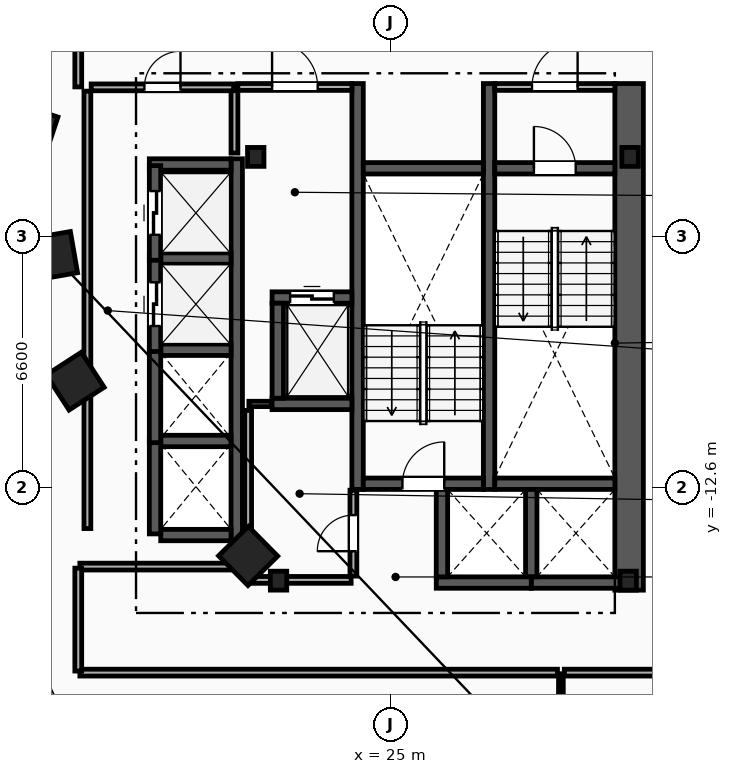
"""IFC4 building model, lengths in metres.
Left out: names, types, materials, properties, quantities, classifications, styles, units other than length and angle.
Written with IfcOpenShell. Run it as: python <this file> out.ifc"""

import sys

from ifc_helpers import new_model, si_unit, direction, frame, frame_2d, origin, origin_2d, place, context, subcontext, project, spatial, rectangle, i_section, extrude, element, fill, save


model = new_model("IFC4")
c1 = context("Model", 3, precision=1e-05, world=origin(), true_north=direction((0.0, 1.0)))
c2 = subcontext(c1, "Body", "Model", "MODEL_VIEW")
j1 = project(units=[si_unit("LENGTHUNIT", "METRE"), si_unit("PLANEANGLEUNIT", "RADIAN")], contexts=[c1])
p1 = place(None, origin())
s1 = spatial("IfcSite", under=j1, at=p1, CompositionType="ELEMENT")
p2 = place(p1, origin())
s2 = spatial("IfcBuilding", under=s1, at=p2, CompositionType="ELEMENT")
p3 = place(p2, frame((0.0, 0.0, 96.2)))
s3 = spatial("IfcBuildingStorey", under=s2, at=p3, CompositionType="ELEMENT", Elevation=96.2)
for number, where, z_axis, x_axis in (
    (1, (31.3, -3.9, 0.0), (0.0, 0.0, 1.0), (1.0, 0.0, 0.0)),
    (2, (21.45, -3.9, 0.0), (0.0, 0.0, 1.0), (1.0, 0.0, 0.0)),
    (3, (22.05, -15.05, 0.0), (0.0, 0.0, 1.0), (1.0, 0.0, 0.0)),
    (4, (31.25, -15.05, 0.0), (0.0, 0.0, 1.0), (1.0, 0.0, 0.0)),
):
    element("IfcColumn", number, at=place(p3, frame(where, z_axis=z_axis, x_axis=x_axis)), inside=s3, PredefinedType="COLUMN", context=c2, shape_type="SweptSolid", body=[
        extrude(i_section(OverallWidth=0.432, OverallDepth=0.498, WebThickness=0.056, FlangeThickness=0.089, FilletRadius=0.018, at=origin_2d()), origin(), (0.0, 0.0, 1.0), 3.6),
    ])
for number, where, z_axis, x_axis in (
    (5, (15.55, -3.2, 0.0), (0.0, 0.0, 1.0), (-0.315, -0.949, 0.0)),
    (6, (16.125, -6.5, 0.0), (0.0, 0.0, 1.0), (0.172, -0.985, 0.0)),
    (7, (16.7, -9.8, 0.0), (0.0, 0.0, 1.0), (0.544, -0.839, 0.0)),
    (8, (21.25, -14.4, 0.0), (0.0, 0.0, 1.0), (0.703, -0.711, 0.0)),
):
    element("IfcColumn", number, at=place(p3, frame(where, z_axis=z_axis, x_axis=x_axis)), inside=s3, PredefinedType="COLUMN", context=c2, shape_type="SweptSolid", body=[
        extrude(rectangle(XDim=1.1, YDim=1.1, at=origin_2d()), origin(), (0.0, 0.0, 1.0), 3.6),
    ])
p4 = place(p3, frame((31.275, -15.3, 0.0), z_axis=(0.0, 0.0, 1.0), x_axis=(0.0, 1.0, 0.0)))
e9 = element("IfcWall", 9, at=p4, inside=s3, PredefinedType="SHEAR", context=c2, shape_type="SweptSolid", body=[
    extrude(rectangle(XDim=13.33, YDim=0.75, at=frame_2d((6.665, 0.0))), origin(), (0.0, 0.0, 1.0), 3.3),
])
for number, where, z_axis, x_axis in (
    (10, (27.59, -12.65, 0.0), (0.0, 0.0, 1.0), (0.0, 1.0, 0.0)),
    (11, (24.13, -12.65, 0.0), (0.0, 0.0, 1.0), (0.0, 1.0, 0.0)),
):
    element("IfcWall", number, at=place(p3, frame(where, z_axis=z_axis, x_axis=x_axis)), inside=s3, PredefinedType="SHEAR", context=c2, shape_type="SweptSolid", body=[
        extrude(rectangle(XDim=10.68, YDim=0.3, at=frame_2d((5.34, 0.0))), origin(), (0.0, 0.0, 1.0), 3.3),
    ])
p5 = place(p3, frame((27.74, -4.2, 0.0), z_axis=(0.0, 0.0, 1.0), x_axis=(1.0, 0.0, 0.0)))
e12 = element("IfcWall", 12, at=p5, inside=s3, PredefinedType="SHEAR", context=c2, shape_type="SweptSolid", body=[
    extrude(rectangle(XDim=3.16, YDim=0.3, at=frame_2d((1.58, 0.0))), origin(), (0.0, 0.0, 1.0), 3.3),
])
p6 = place(p5, frame((1.03, 0.0, 0.0)))
e13 = element("IfcOpeningElement", 13, at=p6, cuts=e12, PredefinedType="OPENING", context=c2, shape_type="SweptSolid", body=[
    extrude(rectangle(XDim=1.1, YDim=2.15, at=frame_2d((0.55, 1.075))), frame((0.0, 0.16, 0.0), z_axis=(0.0, -1.0, 0.0), x_axis=(1.0, 0.0, 0.0)), (0.0, 0.0, 1.0), 0.32),
])
p7 = place(p3, frame((27.74, -12.5, 0.0), z_axis=(0.0, 0.0, 1.0), x_axis=(1.0, 0.0, 0.0)))
e14 = element("IfcWall", 14, at=p7, inside=s3, PredefinedType="SHEAR", context=c2, shape_type="SweptSolid", body=[
    extrude(rectangle(XDim=3.16, YDim=0.3, at=frame_2d((1.58, 0.0))), origin(), (0.0, 0.0, 1.0), 3.3),
])
p8 = place(p3, frame((24.28, -12.5, 0.0), z_axis=(0.0, 0.0, 1.0), x_axis=(1.0, 0.0, 0.0)))
e15 = element("IfcWall", 15, at=p8, inside=s3, PredefinedType="SHEAR", context=c2, shape_type="SweptSolid", body=[
    extrude(rectangle(XDim=3.16, YDim=0.3, at=frame_2d((1.58, 0.0))), origin(), (0.0, 0.0, 1.0), 3.3),
])
p9 = place(p8, frame((1.03, 0.0, 0.0)))
e16 = element("IfcOpeningElement", 16, at=p9, cuts=e15, PredefinedType="OPENING", context=c2, shape_type="SweptSolid", body=[
    extrude(rectangle(XDim=1.1, YDim=2.15, at=frame_2d((0.55, 1.075))), frame((0.0, 0.16, 0.0), z_axis=(0.0, -1.0, 0.0), x_axis=(1.0, 0.0, 0.0)), (0.0, 0.0, 1.0), 0.32),
])
p10 = place(p3, frame((24.28, -4.2, 0.0), z_axis=(0.0, 0.0, 1.0), x_axis=(1.0, 0.0, 0.0)))
e17 = element("IfcWall", 17, at=p10, inside=s3, PredefinedType="SHEAR", context=c2, shape_type="SweptSolid", body=[
    extrude(rectangle(XDim=3.16, YDim=0.3, at=frame_2d((1.58, 0.0))), origin(), (0.0, 0.0, 1.0), 3.3),
])
p11 = place(p3, frame((20.89, -3.8, 0.0), z_axis=(0.0, 0.0, 1.0), x_axis=(0.0, 1.0, 0.0)))
e18 = element("IfcWall", 18, at=p11, inside=s3, PredefinedType="PARTITIONING", context=c2, shape_type="SweptSolid", body=[
    extrude(rectangle(XDim=1.65, YDim=0.18, at=frame_2d((0.825, 0.0))), origin(), (0.0, 0.0, 1.0), 3.3),
])
p12 = place(p3, frame((20.98, -2.06, 0.0), z_axis=(0.0, 0.0, 1.0), x_axis=(1.0, 0.0, 0.0)))
e19 = element("IfcWall", 19, at=p12, inside=s3, PredefinedType="PARTITIONING", context=c2, shape_type="SweptSolid", body=[
    extrude(rectangle(XDim=3.0, YDim=0.18, at=frame_2d((1.5, 0.0))), origin(), (0.0, 0.0, 1.0), 3.3),
])
p13 = place(p12, frame((0.9, 0.0, 0.0)))
e20 = element("IfcOpeningElement", 20, at=p13, cuts=e19, PredefinedType="OPENING", context=c2, shape_type="SweptSolid", body=[
    extrude(rectangle(XDim=1.2, YDim=2.15, at=frame_2d((0.6, 1.075))), frame((0.0, 0.1, 0.0), z_axis=(0.0, -1.0, 0.0), x_axis=(1.0, 0.0, 0.0)), (0.0, 0.0, 1.0), 0.2),
])
p14 = place(p3, frame((27.74, -2.06, 0.0), z_axis=(0.0, 0.0, 1.0), x_axis=(1.0, 0.0, 0.0)))
e21 = element("IfcWall", 21, at=p14, inside=s3, PredefinedType="PARTITIONING", context=c2, shape_type="SweptSolid", body=[
    extrude(rectangle(XDim=3.16, YDim=0.18, at=frame_2d((1.58, 0.0))), origin(), (0.0, 0.0, 1.0), 3.3),
])
p15 = place(p14, frame((0.98, 0.0, 0.0)))
e22 = element("IfcOpeningElement", 22, at=p15, cuts=e21, PredefinedType="OPENING", context=c2, shape_type="SweptSolid", body=[
    extrude(rectangle(XDim=1.2, YDim=2.15, at=frame_2d((0.6, 1.075))), frame((0.0, 0.1, 0.0), z_axis=(0.0, -1.0, 0.0), x_axis=(1.0, 0.0, 0.0)), (0.0, 0.0, 1.0), 0.2),
])
p16 = place(p3, frame((21.88, -7.6, 0.0), z_axis=(0.0, 0.0, 1.0), x_axis=(1.0, 0.0, 0.0)))
e23 = element("IfcWall", 23, at=p16, inside=s3, PredefinedType="SHEAR", context=c2, shape_type="SweptSolid", body=[
    extrude(rectangle(XDim=2.1, YDim=0.3, at=frame_2d((1.05, 0.0))), origin(), (0.0, 0.0, 1.0), 3.3),
])
p17 = place(p16, frame((0.475, 0.0, 0.0)))
e24 = element("IfcOpeningElement", 24, at=p17, cuts=e23, PredefinedType="OPENING", context=c2, shape_type="SweptSolid", body=[
    extrude(rectangle(XDim=1.15, YDim=2.2, at=frame_2d((0.575, 1.1))), frame((0.0, 0.16, 0.0), z_axis=(0.0, -1.0, 0.0), x_axis=(1.0, 0.0, 0.0)), (0.0, 0.0, 1.0), 0.32),
])
p18 = place(p3, frame((21.88, -10.4, 0.0), z_axis=(0.0, 0.0, 1.0), x_axis=(1.0, 0.0, 0.0)))
e25 = element("IfcWall", 25, at=p18, inside=s3, PredefinedType="SHEAR", context=c2, shape_type="SweptSolid", body=[
    extrude(rectangle(XDim=2.1, YDim=0.3, at=frame_2d((1.05, 0.0))), origin(), (0.0, 0.0, 1.0), 3.3),
])
for number, where, z_axis, x_axis in (
    (26, (22.03, -10.25, 0.0), (0.0, 0.0, 1.0), (0.0, 1.0, 0.0)),
    (27, (28.7, -15.1, 0.0), (0.0, 0.0, 1.0), (1.0, 0.0, 0.0)),
):
    element("IfcWall", number, at=place(p3, frame(where, z_axis=z_axis, x_axis=x_axis)), inside=s3, PredefinedType="SHEAR", context=c2, shape_type="SweptSolid", body=[
        extrude(rectangle(XDim=2.5, YDim=0.3, at=frame_2d((1.25, 0.0))), origin(), (0.0, 0.0, 1.0), 3.3),
    ])
p19 = place(p3, frame((28.7, -14.95, 0.0), z_axis=(0.0, 0.0, 1.0), x_axis=(0.0, 1.0, 0.0)))
e28 = element("IfcWall", 28, at=p19, inside=s3, PredefinedType="SHEAR", context=c2, shape_type="SweptSolid", body=[
    extrude(rectangle(XDim=2.3, YDim=0.3, at=frame_2d((1.15, 0.0))), origin(), (0.0, 0.0, 1.0), 3.3),
])
p20 = place(p3, frame((26.2, -15.1, 0.0), z_axis=(0.0, 0.0, 1.0), x_axis=(1.0, 0.0, 0.0)))
e29 = element("IfcWall", 29, at=p20, inside=s3, PredefinedType="SHEAR", context=c2, shape_type="SweptSolid", body=[
    extrude(rectangle(XDim=2.5, YDim=0.3, at=frame_2d((1.25, 0.0))), origin(), (0.0, 0.0, 1.0), 3.3),
])
p21 = place(p3, frame((26.35, -14.95, 0.0), z_axis=(0.0, 0.0, 1.0), x_axis=(0.0, 1.0, 0.0)))
e30 = element("IfcWall", 30, at=p21, inside=s3, PredefinedType="SHEAR", context=c2, shape_type="SweptSolid", body=[
    extrude(rectangle(XDim=2.3, YDim=0.3, at=frame_2d((1.15, 0.0))), origin(), (0.0, 0.0, 1.0), 3.3),
])
p22 = place(p3, frame((20.95, -14.0, 0.0), z_axis=(0.0, 0.0, 1.0), x_axis=(0.0, 1.0, 0.0)))
e31 = element("IfcWall", 31, at=p22, inside=s3, PredefinedType="SHEAR", context=c2, shape_type="SweptSolid", body=[
    extrude(rectangle(XDim=10.05, YDim=0.3, at=frame_2d((5.025, 0.0))), origin(), (0.0, 0.0, 1.0), 3.3),
])
p23 = place(p3, frame((18.95, -13.85, 0.0), z_axis=(0.0, 0.0, 1.0), x_axis=(1.0, 0.0, 0.0)))
e32 = element("IfcWall", 32, at=p23, inside=s3, PredefinedType="SHEAR", context=c2, shape_type="SweptSolid", body=[
    extrude(rectangle(XDim=1.85, YDim=0.3, at=frame_2d((0.925, 0.0))), origin(), (0.0, 0.0, 1.0), 3.3),
])
p24 = place(p3, frame((18.65, -4.1, 0.0), z_axis=(0.0, 0.0, 1.0), x_axis=(1.0, 0.0, 0.0)))
e33 = element("IfcWall", 33, at=p24, inside=s3, PredefinedType="SHEAR", context=c2, shape_type="SweptSolid", body=[
    extrude(rectangle(XDim=2.15, YDim=0.3, at=frame_2d((1.075, 0.0))), origin(), (0.0, 0.0, 1.0), 3.3),
])
for number, where, z_axis, x_axis in (
    (34, (18.95, -11.375, 0.0), (0.0, 0.0, 1.0), (1.0, 0.0, 0.0)),
    (35, (18.95, -8.975, 0.0), (0.0, 0.0, 1.0), (1.0, 0.0, 0.0)),
    (36, (18.95, -6.575, 0.0), (0.0, 0.0, 1.0), (1.0, 0.0, 0.0)),
):
    element("IfcWall", number, at=place(p3, frame(where, z_axis=z_axis, x_axis=x_axis)), inside=s3, PredefinedType="SHEAR", context=c2, shape_type="SweptSolid", body=[
        extrude(rectangle(XDim=1.85, YDim=0.3, at=frame_2d((0.925, 0.0))), origin(), (0.0, 0.0, 1.0), 3.3),
    ])
for number, where, z_axis, x_axis in (
    (37, (18.8, -13.82, 0.0), (0.0, 0.0, 1.0), (0.0, 1.0, 0.0)),
    (38, (18.8, -11.42, 0.0), (0.0, 0.0, 1.0), (0.0, 1.0, 0.0)),
):
    element("IfcWall", number, at=place(p3, frame(where, z_axis=z_axis, x_axis=x_axis)), inside=s3, PredefinedType="SHEAR", context=c2, shape_type="SweptSolid", body=[
        extrude(rectangle(XDim=2.49, YDim=0.3, at=frame_2d((1.245, 0.0))), origin(), (0.0, 0.0, 1.0), 3.3),
    ])
p25 = place(p3, frame((18.8, -9.02, 0.0), z_axis=(0.0, 0.0, 1.0), x_axis=(0.0, 1.0, 0.0)))
e39 = element("IfcWall", 39, at=p25, inside=s3, PredefinedType="SHEAR", context=c2, shape_type="SweptSolid", body=[
    extrude(rectangle(XDim=2.49, YDim=0.3, at=frame_2d((1.245, 0.0))), origin(), (0.0, 0.0, 1.0), 3.3),
])
p26 = place(p25, frame((0.67, 0.0, 0.0)))
e40 = element("IfcOpeningElement", 40, at=p26, cuts=e39, PredefinedType="OPENING", context=c2, shape_type="SweptSolid", body=[
    extrude(rectangle(XDim=1.15, YDim=2.2, at=frame_2d((0.575, 1.1))), frame((0.0, 0.16, 0.0), z_axis=(0.0, -1.0, 0.0), x_axis=(1.0, 0.0, 0.0)), (0.0, 0.0, 1.0), 0.32),
])
p27 = place(p3, frame((18.8, -6.62, 0.0), z_axis=(0.0, 0.0, 1.0), x_axis=(0.0, 1.0, 0.0)))
e41 = element("IfcWall", 41, at=p27, inside=s3, PredefinedType="SHEAR", context=c2, shape_type="SweptSolid", body=[
    extrude(rectangle(XDim=2.49, YDim=0.3, at=frame_2d((1.245, 0.0))), origin(), (0.0, 0.0, 1.0), 3.3),
])
p28 = place(p27, frame((0.67, 0.0, 0.0)))
e42 = element("IfcOpeningElement", 42, at=p28, cuts=e41, PredefinedType="OPENING", context=c2, shape_type="SweptSolid", body=[
    extrude(rectangle(XDim=1.15, YDim=2.2, at=frame_2d((0.575, 1.1))), frame((0.0, 0.16, 0.0), z_axis=(0.0, -1.0, 0.0), x_axis=(1.0, 0.0, 0.0)), (0.0, 0.0, 1.0), 0.32),
])
p29 = place(p3, frame((17.02, -13.68, 0.0), z_axis=(0.0, 0.0, 1.0), x_axis=(0.0, 1.0, 0.0)))
e43 = element("IfcWall", 43, at=p29, inside=s3, PredefinedType="PARTITIONING", context=c2, shape_type="SweptSolid", body=[
    extrude(rectangle(XDim=11.51, YDim=0.18, at=frame_2d((5.755, 0.0))), origin(), (0.0, 0.0, 1.0), 3.3),
])
p30 = place(p3, frame((17.12, -2.07, 0.0), z_axis=(0.0, 0.0, 1.0), x_axis=(1.0, 0.0, 0.0)))
e44 = element("IfcWall", 44, at=p30, inside=s3, PredefinedType="PARTITIONING", context=c2, shape_type="SweptSolid", body=[
    extrude(rectangle(XDim=3.75, YDim=0.18, at=frame_2d((1.875, 0.0))), origin(), (0.0, 0.0, 1.0), 3.3),
])
p31 = place(p30, frame((1.4, 0.0, 0.0)))
e45 = element("IfcOpeningElement", 45, at=p31, cuts=e44, PredefinedType="OPENING", context=c2, shape_type="SweptSolid", body=[
    extrude(rectangle(XDim=0.95, YDim=2.1, at=frame_2d((0.475, 1.05))), frame((0.0, 0.1, 0.0), z_axis=(0.0, -1.0, 0.0), x_axis=(1.0, 0.0, 0.0)), (0.0, 0.0, 1.0), 0.2),
])
p32 = place(p3, frame((21.27, -10.4, 0.0), z_axis=(0.0, 0.0, 1.0), x_axis=(1.0, 0.0, 0.0)))
e46 = element("IfcWall", 46, at=p32, inside=s3, PredefinedType="PARTITIONING", context=c2, shape_type="SweptSolid", body=[
    extrude(rectangle(XDim=0.59, YDim=0.14, at=frame_2d((0.295, 0.0))), origin(), (0.0, 0.0, 1.0), 3.3),
])
p33 = place(p3, frame((21.25, -14.93, 0.0), z_axis=(0.0, 0.0, 1.0), x_axis=(0.0, 1.0, 0.0)))
e47 = element("IfcWall", 47, at=p33, inside=s3, PredefinedType="PARTITIONING", context=c2, shape_type="SweptSolid", body=[
    extrude(rectangle(XDim=4.36, YDim=0.18, at=frame_2d((2.18, 0.0))), origin(), (0.0, 0.0, 1.0), 3.3),
])
p34 = place(p3, frame((21.35, -15.03, 0.0), z_axis=(0.0, 0.0, 1.0), x_axis=(1.0, 0.0, 0.0)))
e48 = element("IfcWall", 48, at=p34, inside=s3, PredefinedType="PARTITIONING", context=c2, shape_type="SweptSolid", body=[
    extrude(rectangle(XDim=2.61, YDim=0.18, at=frame_2d((1.305, 0.0))), origin(), (0.0, 0.0, 1.0), 2.373),
])
p35 = place(p3, frame((24.02, -14.93, 0.0), z_axis=(0.0, 0.0, 1.0), x_axis=(0.0, 1.0, 0.0)))
e49 = element("IfcWall", 49, at=p35, inside=s3, PredefinedType="PARTITIONING", context=c2, shape_type="SweptSolid", body=[
    extrude(rectangle(XDim=2.26, YDim=0.18, at=frame_2d((1.13, 0.0))), origin(), (0.0, 0.0, 1.0), 3.3),
])
p36 = place(p35, frame((0.655, 0.0, 0.0)))
e50 = element("IfcOpeningElement", 50, at=p36, cuts=e49, PredefinedType="OPENING", context=c2, shape_type="SweptSolid", body=[
    extrude(rectangle(XDim=0.95, YDim=2.1, at=frame_2d((0.475, 1.05))), frame((0.0, 0.1, 0.0), z_axis=(0.0, -1.0, 0.0), x_axis=(1.0, 0.0, 0.0)), (0.0, 0.0, 1.0), 0.2),
])
p37 = place(p3, frame((29.48, -25.985, 0.0), z_axis=(0.0, 0.0, 1.0), x_axis=(0.0, 1.0, 0.0)))
e51 = element("IfcWall", 51, at=p37, inside=s3, PredefinedType="PARTITIONING", context=c2, shape_type="SweptSolid", body=[
    extrude(rectangle(XDim=8.485, YDim=0.125, at=frame_2d((4.243, 0.0))), origin(), (0.0, 0.0, 1.0), 3.3),
])
p38 = place(p3, frame((29.57, -17.47, 0.0), z_axis=(0.0, 0.0, 1.0), x_axis=(1.0, 0.0, 0.0)))
e52 = element("IfcWall", 52, at=p38, inside=s3, PredefinedType="PARTITIONING", context=c2, shape_type="SweptSolid", body=[
    extrude(rectangle(XDim=4.058, YDim=0.18, at=frame_2d((2.029, 0.0))), origin(), (0.0, 0.0, 1.0), 3.3),
])
p39 = place(p3, frame((16.822, -17.47, 0.0), z_axis=(0.0, 0.0, 1.0), x_axis=(1.0, 0.0, 0.0)))
e53 = element("IfcWall", 53, at=p39, inside=s3, PredefinedType="PARTITIONING", context=c2, shape_type="SweptSolid", body=[
    extrude(rectangle(XDim=12.568, YDim=0.18, at=frame_2d((6.284, 0.0))), origin(), (0.0, 0.0, 1.0), 3.3),
])
p40 = place(p3, frame((21.178, -14.68, 0.0), z_axis=(0.0, 0.0, 1.0), x_axis=(-1.0, 0.0, 0.0)))
e54 = element("IfcWall", 54, at=p40, inside=s3, PredefinedType="PARTITIONING", context=c2, shape_type="SweptSolid", body=[
    extrude(rectangle(XDim=4.357, YDim=0.18, at=frame_2d((2.178, 0.0))), origin(), (0.0, 0.0, 1.0), 3.3),
])
p41 = place(p3, frame((16.78, -14.721, 0.0), z_axis=(0.0, 0.0, 1.0), x_axis=(0.0, -1.0, 0.0)))
e55 = element("IfcWall", 55, at=p41, inside=s3, PredefinedType="PARTITIONING", context=c2, shape_type="SweptSolid", body=[
    extrude(rectangle(XDim=2.707, YDim=0.18, at=frame_2d((1.354, 0.0))), origin(), (0.0, 0.0, 1.0), 3.3),
])
p42 = place(p3, frame((16.78, 0.329, 0.0), z_axis=(0.0, 0.0, 1.0), x_axis=(0.0, -1.0, 0.0)))
e56 = element("IfcWall", 56, at=p42, inside=s3, PredefinedType="PARTITIONING", context=c2, shape_type="SweptSolid", body=[
    extrude(rectangle(XDim=2.387, YDim=0.18, at=frame_2d((1.194, 0.0))), origin(), (0.0, 0.0, 1.0), 3.3),
])
p43 = place(p6, origin())
e57 = element("IfcDoor", 57, at=p43, inside=s3, OperationType="SINGLE_SWING_LEFT", PredefinedType="DOOR", context=c2, shape_type="SweptSolid", body=[
    extrude(rectangle(XDim=1.1, YDim=2.15, at=frame_2d((0.55, 1.075))), frame((0.0, 0.025, 0.0), z_axis=(0.0, -1.0, 0.0), x_axis=(1.0, 0.0, 0.0)), (0.0, 0.0, 1.0), 0.05),
])
fill(e13, e57)
p44 = place(p9, origin())
e58 = element("IfcDoor", 58, at=p44, inside=s3, OperationType="SINGLE_SWING_RIGHT", PredefinedType="DOOR", context=c2, shape_type="SweptSolid", body=[
    extrude(rectangle(XDim=1.1, YDim=2.15, at=frame_2d((0.55, 1.075))), frame((0.0, 0.025, 0.0), z_axis=(0.0, -1.0, 0.0), x_axis=(1.0, 0.0, 0.0)), (0.0, 0.0, 1.0), 0.05),
])
fill(e16, e58)
p45 = place(p13, origin())
e59 = element("IfcDoor", 59, at=p45, inside=s3, OperationType="SINGLE_SWING_LEFT", PredefinedType="DOOR", context=c2, shape_type="SweptSolid", body=[
    extrude(rectangle(XDim=1.2, YDim=2.15, at=frame_2d((0.6, 1.075))), frame((0.0, 0.025, 0.0), z_axis=(0.0, -1.0, 0.0), x_axis=(1.0, 0.0, 0.0)), (0.0, 0.0, 1.0), 0.05),
])
fill(e20, e59)
p46 = place(p15, origin())
e60 = element("IfcDoor", 60, at=p46, inside=s3, OperationType="SINGLE_SWING_RIGHT", PredefinedType="DOOR", context=c2, shape_type="SweptSolid", body=[
    extrude(rectangle(XDim=1.2, YDim=2.15, at=frame_2d((0.6, 1.075))), frame((0.0, 0.025, 0.0), z_axis=(0.0, -1.0, 0.0), x_axis=(1.0, 0.0, 0.0)), (0.0, 0.0, 1.0), 0.05),
])
fill(e22, e60)
p47 = place(p17, origin())
e61 = element("IfcDoor", 61, at=p47, inside=s3, OperationType="SLIDING_TO_LEFT", PredefinedType="TRAPDOOR", context=c2, shape_type="SweptSolid", body=[
    extrude(rectangle(XDim=1.15, YDim=2.2, at=frame_2d((0.575, 1.1))), frame((0.0, 0.025, 0.0), z_axis=(0.0, -1.0, 0.0), x_axis=(1.0, 0.0, 0.0)), (0.0, 0.0, 1.0), 0.05),
])
fill(e24, e61)
p48 = place(p26, origin())
e62 = element("IfcDoor", 62, at=p48, inside=s3, OperationType="SLIDING_TO_LEFT", PredefinedType="TRAPDOOR", context=c2, shape_type="SweptSolid", body=[
    extrude(rectangle(XDim=1.15, YDim=2.2, at=frame_2d((0.575, 1.1))), frame((0.0, 0.025, 0.0), z_axis=(0.0, -1.0, 0.0), x_axis=(1.0, 0.0, 0.0)), (0.0, 0.0, 1.0), 0.05),
])
fill(e40, e62)
p49 = place(p28, origin())
e63 = element("IfcDoor", 63, at=p49, inside=s3, OperationType="SLIDING_TO_LEFT", PredefinedType="TRAPDOOR", context=c2, shape_type="SweptSolid", body=[
    extrude(rectangle(XDim=1.15, YDim=2.2, at=frame_2d((0.575, 1.1))), frame((0.0, 0.025, 0.0), z_axis=(0.0, -1.0, 0.0), x_axis=(1.0, 0.0, 0.0)), (0.0, 0.0, 1.0), 0.05),
])
fill(e42, e63)
p50 = place(p31, origin())
e64 = element("IfcDoor", 64, at=p50, inside=s3, OperationType="SINGLE_SWING_RIGHT", PredefinedType="DOOR", context=c2, shape_type="SweptSolid", body=[
    extrude(rectangle(XDim=0.95, YDim=2.1, at=frame_2d((0.475, 1.05))), frame((0.0, 0.025, 0.0), z_axis=(0.0, -1.0, 0.0), x_axis=(1.0, 0.0, 0.0)), (0.0, 0.0, 1.0), 0.05),
])
fill(e45, e64)
p51 = place(p36, origin())
e65 = element("IfcDoor", 65, at=p51, inside=s3, OperationType="SINGLE_SWING_LEFT", PredefinedType="DOOR", context=c2, shape_type="SweptSolid", body=[
    extrude(rectangle(XDim=0.95, YDim=2.1, at=frame_2d((0.475, 1.05))), frame((0.0, 0.025, 0.0), z_axis=(0.0, -1.0, 0.0), x_axis=(1.0, 0.0, 0.0)), (0.0, 0.0, 1.0), 0.05),
])
fill(e50, e65)
save(model, sys.argv[1])
